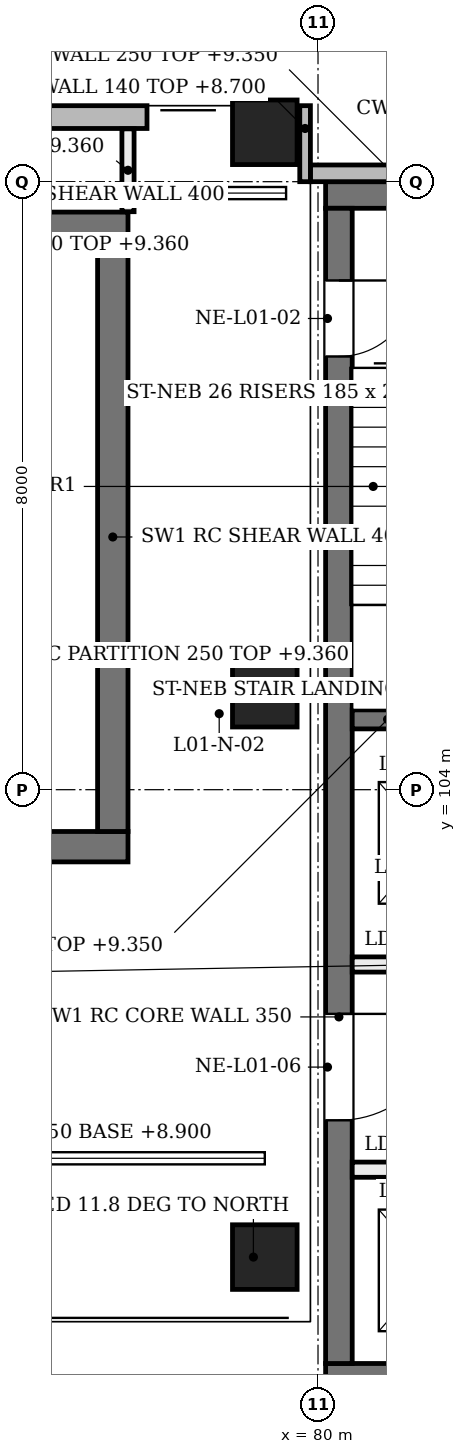
"""IFC4 building model, lengths in metres.
Left out: names, types, materials, properties, quantities, classifications, styles, units other than length and angle.
Written with IfcOpenShell. Run it as: python <this file> out.ifc"""

import sys

from ifc_helpers import new_model, si_unit, direction, frame, frame_2d, origin, origin_2d, place, context, subcontext, project, spatial, rectangle, extrude, element, fill, save


model = new_model("IFC4")
c1 = context("Model", 3, precision=1e-05, world=origin(), true_north=direction((0.0, 1.0)))
c2 = subcontext(c1, "Body", "Model", "MODEL_VIEW")
j1 = project(units=[si_unit("LENGTHUNIT", "METRE"), si_unit("PLANEANGLEUNIT", "RADIAN")], contexts=[c1])
p1 = place(None, origin())
s1 = spatial("IfcSite", under=j1, at=p1, CompositionType="ELEMENT")
p2 = place(p1, origin())
s2 = spatial("IfcBuilding", under=s1, at=p2, CompositionType="ELEMENT")
p3 = place(p2, frame((0.0, 0.0, 4.8)))
s3 = spatial("IfcBuildingStorey", under=s2, at=p3, CompositionType="ELEMENT", Elevation=4.8)
p4 = place(p3, frame((68.0, 103.25, 0.0), z_axis=(0.0, 0.0, 1.0), x_axis=(1.0, 0.0, 0.0)))
e1 = element("IfcWall", 1, at=p4, inside=s3, PredefinedType="SHEAR", context=c2, shape_type="SweptSolid", body=[
    extrude(rectangle(XDim=9.5, YDim=0.4, at=frame_2d((4.75, 0.0))), origin(), (0.0, 0.0, 1.0), 4.58),
])
p5 = place(p4, frame((1.25, 0.0, 0.0)))
e2 = element("IfcOpeningElement", 2, at=p5, cuts=e1, PredefinedType="OPENING", context=c2, shape_type="SweptSolid", body=[
    extrude(rectangle(XDim=1.05, YDim=2.2, at=frame_2d((0.525, 1.1))), frame((0.0, 0.21, 0.0), z_axis=(0.0, -1.0, 0.0), x_axis=(1.0, 0.0, 0.0)), (0.0, 0.0, 1.0), 0.42),
])
p6 = place(p4, frame((4.15, 0.0, 0.0)))
e3 = element("IfcOpeningElement", 3, at=p6, cuts=e1, PredefinedType="OPENING", context=c2, shape_type="SweptSolid", body=[
    extrude(rectangle(XDim=1.05, YDim=2.2, at=frame_2d((0.525, 1.1))), frame((0.0, 0.21, 0.0), z_axis=(0.0, -1.0, 0.0), x_axis=(1.0, 0.0, 0.0)), (0.0, 0.0, 1.0), 0.42),
])
p7 = place(p4, frame((7.05, 0.0, 0.0)))
e4 = element("IfcOpeningElement", 4, at=p7, cuts=e1, PredefinedType="OPENING", context=c2, shape_type="SweptSolid", body=[
    extrude(rectangle(XDim=1.05, YDim=2.2, at=frame_2d((0.525, 1.1))), frame((0.0, 0.21, 0.0), z_axis=(0.0, -1.0, 0.0), x_axis=(1.0, 0.0, 0.0)), (0.0, 0.0, 1.0), 0.42),
])
p8 = place(p3, frame((68.0, 111.4, 0.0), z_axis=(0.0, 0.0, 1.0), x_axis=(1.0, 0.0, 0.0)))
e5 = element("IfcWall", 5, at=p8, inside=s3, PredefinedType="SHEAR", context=c2, shape_type="SweptSolid", body=[
    extrude(rectangle(XDim=9.5, YDim=0.4, at=frame_2d((4.75, 0.0))), origin(), (0.0, 0.0, 1.0), 4.58),
])
p9 = place(p3, frame((77.3, 103.45, 0.0), z_axis=(0.0, 0.0, 1.0), x_axis=(0.0, 1.0, 0.0)))
e6 = element("IfcWall", 6, at=p9, inside=s3, PredefinedType="SHEAR", context=c2, shape_type="SweptSolid", body=[
    extrude(rectangle(XDim=7.75, YDim=0.4, at=frame_2d((3.875, 0.0))), origin(), (0.0, 0.0, 1.0), 4.58),
])
for number, where, z_axis, x_axis in (
    (7, (80.1, 96.275, 0.0), (0.0, 0.0, 1.0), (1.0, 0.0, 0.0)),
    (8, (80.1, 111.825, 0.0), (0.0, 0.0, 1.0), (1.0, 0.0, 0.0)),
):
    element("IfcWall", number, at=place(p3, frame(where, z_axis=z_axis, x_axis=x_axis)), inside=s3, PredefinedType="SHEAR", context=c2, shape_type="SweptSolid", body=[
        extrude(rectangle(XDim=7.9, YDim=0.35, at=frame_2d((3.95, 0.0))), origin(), (0.0, 0.0, 1.0), 4.58),
    ])
p10 = place(p3, frame((80.275, 96.45, 0.0), z_axis=(0.0, 0.0, 1.0), x_axis=(0.0, 1.0, 0.0)))
e9 = element("IfcWall", 9, at=p10, inside=s3, PredefinedType="SHEAR", context=c2, shape_type="SweptSolid", body=[
    extrude(rectangle(XDim=15.2, YDim=0.35, at=frame_2d((7.6, 0.0))), origin(), (0.0, 0.0, 1.0), 4.58),
])
p11 = place(p10, frame((13.25, 0.0, 0.0)))
e10 = element("IfcOpeningElement", 10, at=p11, cuts=e9, PredefinedType="OPENING", context=c2, shape_type="SweptSolid", body=[
    extrude(rectangle(XDim=1.0, YDim=2.1, at=frame_2d((0.5, 1.05))), frame((0.0, 0.185, 0.0), z_axis=(0.0, -1.0, 0.0), x_axis=(1.0, 0.0, 0.0)), (0.0, 0.0, 1.0), 0.37),
])
p12 = place(p10, frame((3.2, 0.0, 0.0)))
e11 = element("IfcOpeningElement", 11, at=p12, cuts=e9, PredefinedType="OPENING", context=c2, shape_type="SweptSolid", body=[
    extrude(rectangle(XDim=1.4, YDim=2.1, at=frame_2d((0.7, 1.05))), frame((0.0, 0.185, 0.0), z_axis=(0.0, -1.0, 0.0), x_axis=(1.0, 0.0, 0.0)), (0.0, 0.0, 1.0), 0.37),
])
for number, where, z_axis, x_axis in (
    (12, (79.3, 97.6, 0.0), (0.0, 0.204, 0.979), (-1.0, 0.0, 0.0)),
    (13, (79.3, 105.0, 0.0), (0.0, 0.204, 0.979), (-1.0, 0.0, 0.0)),
    (14, (79.3, 112.4, 0.0), (0.0, 0.204, 0.979), (-1.0, 0.0, 0.0)),
):
    element("IfcColumn", number, at=place(p3, frame(where, z_axis=z_axis, x_axis=x_axis)), inside=s3, PredefinedType="COLUMN", context=c2, shape_type="SweptSolid", body=[
        extrude(rectangle(XDim=0.85, YDim=0.85, at=origin_2d()), origin(), (0.0, 0.0, 1.0), 4.903),
    ])
p13 = place(p3, frame((26.25, 112.85, 0.0), z_axis=(0.0, 0.0, 1.0), x_axis=(1.0, 0.0, 0.0)))
e15 = element("IfcWall", 15, at=p13, inside=s3, PredefinedType="SOLIDWALL", context=c2, shape_type="SweptSolid", body=[
    extrude(rectangle(XDim=51.5, YDim=0.3, at=frame_2d((25.75, 0.0))), origin(), (0.0, 0.0, 1.0), 3.9),
])
p14 = place(p3, frame((72.2, 99.15, 4.1), z_axis=(0.0, 0.0, 1.0), x_axis=(1.0, 0.0, 0.0)))
e16 = element("IfcWall", 16, at=p14, inside=s3, PredefinedType="SOLIDWALL", context=c2, shape_type="SweptSolid", body=[
    extrude(rectangle(XDim=6.9, YDim=0.15, at=frame_2d((3.45, 0.0))), origin(), (0.0, 0.0, 1.0), 0.48),
])
p15 = place(p3, frame((79.9, 112.11, 0.0), z_axis=(0.0, 0.0, 1.0), x_axis=(1.0, 0.0, 0.0)))
e17 = element("IfcWall", 17, at=p15, inside=s3, PredefinedType="SOLIDWALL", context=c2, shape_type="SweptSolid", body=[
    extrude(rectangle(XDim=8.2, YDim=0.22, at=frame_2d((4.1, 0.0))), origin(), (0.0, 0.0, 1.0), 3.9),
])
p16 = place(p15, frame((1.308, 0.0, 0.9)))
e18 = element("IfcOpeningElement", 18, at=p16, cuts=e17, PredefinedType="OPENING", context=c2, shape_type="SweptSolid", body=[
    extrude(rectangle(XDim=0.45, YDim=2.6, at=frame_2d((0.225, 1.3))), frame((0.0, 0.12, 0.0), z_axis=(0.0, -1.0, 0.0), x_axis=(1.0, 0.0, 0.0)), (0.0, 0.0, 1.0), 0.24),
])
p17 = place(p15, frame((3.975, 0.0, 0.9)))
e19 = element("IfcOpeningElement", 19, at=p17, cuts=e17, PredefinedType="OPENING", context=c2, shape_type="SweptSolid", body=[
    extrude(rectangle(XDim=0.45, YDim=2.6, at=frame_2d((0.225, 1.3))), frame((0.0, 0.12, 0.0), z_axis=(0.0, -1.0, 0.0), x_axis=(1.0, 0.0, 0.0)), (0.0, 0.0, 1.0), 0.24),
])
p18 = place(p15, frame((6.642, 0.0, 0.9)))
e20 = element("IfcOpeningElement", 20, at=p18, cuts=e17, PredefinedType="OPENING", context=c2, shape_type="SweptSolid", body=[
    extrude(rectangle(XDim=0.45, YDim=2.6, at=frame_2d((0.225, 1.3))), frame((0.0, 0.12, 0.0), z_axis=(0.0, -1.0, 0.0), x_axis=(1.0, 0.0, 0.0)), (0.0, 0.0, 1.0), 0.24),
])
p19 = place(p3, frame((79.83, 112.0, 0.0), z_axis=(0.0, 0.0, 1.0), x_axis=(0.0, 1.0, 0.0)))
e21 = element("IfcWall", 21, at=p19, inside=s3, PredefinedType="SOLIDWALL", context=c2, shape_type="SweptSolid", body=[
    extrude(rectangle(XDim=1.0, YDim=0.14, at=frame_2d((0.5, 0.0))), origin(), (0.0, 0.0, 1.0), 3.9),
])
p20 = place(p3, frame((83.55, 104.925, 0.0), z_axis=(0.0, 0.0, 1.0), x_axis=(-1.0, 0.0, 0.0)))
e22 = element("IfcWall", 22, at=p20, inside=s3, PredefinedType="SOLIDWALL", context=c2, shape_type="SweptSolid", body=[
    extrude(rectangle(XDim=3.1, YDim=0.25, at=frame_2d((1.55, 0.0))), origin(), (0.0, 0.0, 1.0), 4.55),
])
p21 = place(p3, frame((87.65, 101.7, 0.0), z_axis=(0.0, 0.0, 1.0), x_axis=(-1.0, 0.0, 0.0)))
e23 = element("IfcWall", 23, at=p21, inside=s3, PredefinedType="SOLIDWALL", context=c2, shape_type="SweptSolid", body=[
    extrude(rectangle(XDim=7.2, YDim=0.2, at=frame_2d((3.6, 0.0))), origin(), (0.0, 0.0, 1.0), 4.55),
])
p22 = place(p21, frame((0.5, 0.0, 0.0)))
e24 = element("IfcOpeningElement", 24, at=p22, cuts=e23, PredefinedType="OPENING", context=c2, shape_type="SweptSolid", body=[
    extrude(rectangle(XDim=1.1, YDim=2.1, at=frame_2d((0.55, 1.05))), frame((0.0, 0.11, 0.0), z_axis=(0.0, -1.0, 0.0), x_axis=(1.0, 0.0, 0.0)), (0.0, 0.0, 1.0), 0.22),
])
p23 = place(p21, frame((5.6, 0.0, 0.0)))
e25 = element("IfcOpeningElement", 25, at=p23, cuts=e23, PredefinedType="OPENING", context=c2, shape_type="SweptSolid", body=[
    extrude(rectangle(XDim=1.1, YDim=2.1, at=frame_2d((0.55, 1.05))), frame((0.0, 0.11, 0.0), z_axis=(0.0, -1.0, 0.0), x_axis=(1.0, 0.0, 0.0)), (0.0, 0.0, 1.0), 0.22),
])
p24 = place(p21, frame((3.1, 0.0, 0.0)))
e26 = element("IfcOpeningElement", 26, at=p24, cuts=e23, PredefinedType="OPENING", context=c2, shape_type="SweptSolid", body=[
    extrude(rectangle(XDim=1.0, YDim=2.1, at=frame_2d((0.5, 1.05))), frame((0.0, 0.11, 0.0), z_axis=(0.0, -1.0, 0.0), x_axis=(1.0, 0.0, 0.0)), (0.0, 0.0, 1.0), 0.22),
])
p25 = place(p3, frame((87.65, 99.0, 0.0), z_axis=(0.0, 0.0, 1.0), x_axis=(-1.0, 0.0, 0.0)))
e27 = element("IfcWall", 27, at=p25, inside=s3, PredefinedType="SOLIDWALL", context=c2, shape_type="SweptSolid", body=[
    extrude(rectangle(XDim=7.2, YDim=0.2, at=frame_2d((3.6, 0.0))), origin(), (0.0, 0.0, 1.0), 4.55),
])
p26 = place(p25, frame((0.5, 0.0, 0.0)))
e28 = element("IfcOpeningElement", 28, at=p26, cuts=e27, PredefinedType="OPENING", context=c2, shape_type="SweptSolid", body=[
    extrude(rectangle(XDim=1.1, YDim=2.1, at=frame_2d((0.55, 1.05))), frame((0.0, 0.11, 0.0), z_axis=(0.0, -1.0, 0.0), x_axis=(1.0, 0.0, 0.0)), (0.0, 0.0, 1.0), 0.22),
])
p27 = place(p25, frame((5.6, 0.0, 0.0)))
e29 = element("IfcOpeningElement", 29, at=p27, cuts=e27, PredefinedType="OPENING", context=c2, shape_type="SweptSolid", body=[
    extrude(rectangle(XDim=1.1, YDim=2.1, at=frame_2d((0.55, 1.05))), frame((0.0, 0.11, 0.0), z_axis=(0.0, -1.0, 0.0), x_axis=(1.0, 0.0, 0.0)), (0.0, 0.0, 1.0), 0.22),
])
p28 = place(p25, frame((3.1, 0.0, 0.0)))
e30 = element("IfcOpeningElement", 30, at=p28, cuts=e27, PredefinedType="OPENING", context=c2, shape_type="SweptSolid", body=[
    extrude(rectangle(XDim=1.0, YDim=2.1, at=frame_2d((0.5, 1.05))), frame((0.0, 0.11, 0.0), z_axis=(0.0, -1.0, 0.0), x_axis=(1.0, 0.0, 0.0)), (0.0, 0.0, 1.0), 0.22),
])
p29 = place(p3, frame((77.5, 111.605, 0.0), z_axis=(0.0, 0.0, 1.0), x_axis=(0.0, 1.0, 0.0)))
e31 = element("IfcWall", 31, at=p29, inside=s3, PredefinedType="PARTITIONING", context=c2, shape_type="SweptSolid", body=[
    extrude(rectangle(XDim=1.09, YDim=0.16, at=frame_2d((0.545, 0.0))), origin(), (0.0, 0.0, 1.0), 4.56),
])
p30 = place(p11, origin())
e32 = element("IfcDoor", 32, at=p30, inside=s3, OperationType="SINGLE_SWING_RIGHT", PredefinedType="DOOR", context=c2, shape_type="SweptSolid", body=[
    extrude(rectangle(XDim=1.0, YDim=2.1, at=frame_2d((0.5, 1.05))), frame((0.0, 0.025, 0.0), z_axis=(0.0, -1.0, 0.0), x_axis=(1.0, 0.0, 0.0)), (0.0, 0.0, 1.0), 0.05),
])
fill(e10, e32)
p31 = place(p12, origin())
e33 = element("IfcDoor", 33, at=p31, inside=s3, OperationType="SINGLE_SWING_RIGHT", PredefinedType="DOOR", context=c2, shape_type="SweptSolid", body=[
    extrude(rectangle(XDim=1.4, YDim=2.1, at=frame_2d((0.7, 1.05))), frame((0.0, 0.025, 0.0), z_axis=(0.0, -1.0, 0.0), x_axis=(1.0, 0.0, 0.0)), (0.0, 0.0, 1.0), 0.05),
])
fill(e11, e33)
save(model, sys.argv[1])
